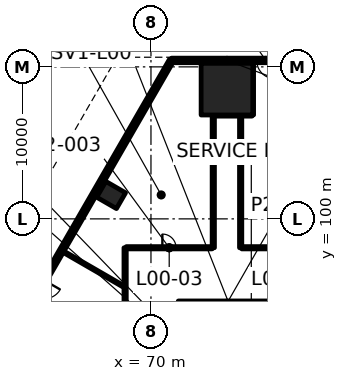
"""IFC4 building model, lengths in metres.
Left out: names, types, materials, properties, quantities, classifications, styles, units other than length and angle.
Written with IfcOpenShell. Run it as: python <this file> out.ifc"""

import sys

from ifc_helpers import new_model, si_unit, direction, frame, frame_2d, origin, origin_2d, place, context, subcontext, project, spatial, rectangle, extrude, element, fill, save


model = new_model("IFC4")
c1 = context("Model", 3, precision=1e-05, world=origin(), true_north=direction((0.0, 1.0)))
c2 = subcontext(c1, "Body", "Model", "MODEL_VIEW")
j1 = project(units=[si_unit("LENGTHUNIT", "METRE"), si_unit("PLANEANGLEUNIT", "RADIAN")], contexts=[c1])
p1 = place(None, origin())
s1 = spatial("IfcSite", under=j1, at=p1, CompositionType="ELEMENT")
p2 = place(p1, origin())
s2 = spatial("IfcBuilding", under=s1, at=p2, CompositionType="ELEMENT")
p3 = place(p2, origin())
s3 = spatial("IfcBuildingStorey", under=s2, at=p3, CompositionType="ELEMENT", Elevation=0.0)
p4 = place(p3, frame((75.0, 108.534, 0.0), z_axis=(0.0, 0.0, 1.0), x_axis=(-1.0, 0.0, 0.0)))
e1 = element("IfcColumn", 1, at=p4, inside=s3, PredefinedType="COLUMN", context=c2, shape_type="SweptSolid", body=[
    extrude(rectangle(XDim=3.4, YDim=3.4, at=origin_2d()), origin(), (0.0, 0.0, 1.0), 8.0),
])
p5 = place(p3, frame((67.379, 101.57, 0.0), z_axis=(0.0, 0.0, 1.0), x_axis=(-0.5, -0.866025403784, 0.0)))
e2 = element("IfcColumn", 2, at=p5, inside=s3, PredefinedType="COLUMN", context=c2, shape_type="SweptSolid", body=[
    extrude(rectangle(XDim=1.2, YDim=1.5, at=origin_2d()), origin(), (0.0, 0.0, 1.0), 8.0),
])
p6 = place(p3, frame((71.8, 94.45, 0.0), z_axis=(0.0, 0.0, 1.0), x_axis=(1.0, 0.0, 0.0)))
e3 = element("IfcWall", 3, at=p6, inside=s3, PredefinedType="SHEAR", context=c2, shape_type="SweptSolid", body=[
    extrude(rectangle(XDim=6.4, YDim=0.3, at=frame_2d((3.2, 0.0))), origin(), (0.0, 0.0, 1.0), 7.7),
])
p7 = place(p3, frame((68.375, 98.1, 0.0), z_axis=(0.0, 0.0, 1.0), x_axis=(1.0, 0.0, 0.0)))
e4 = element("IfcWall", 4, at=p7, inside=s3, PredefinedType="PARTITIONING", context=c2, shape_type="SweptSolid", body=[
    extrude(rectangle(XDim=5.649, YDim=0.15, at=frame_2d((2.825, 0.0))), origin(), (0.0, 0.0, 1.0), 7.1),
])
p8 = place(p7, frame((2.375, 0.0, 0.0)))
e5 = element("IfcOpeningElement", 5, at=p8, cuts=e4, PredefinedType="OPENING", context=c2, shape_type="SweptSolid", body=[
    extrude(rectangle(XDim=0.9, YDim=2.1, at=frame_2d((0.45, 1.05))), frame((0.0, 0.085, 0.0), z_axis=(0.0, -1.0, 0.0), x_axis=(1.0, 0.0, 0.0)), (0.0, 0.0, 1.0), 0.17),
])
p9 = place(p3, frame((75.975, 98.1, 0.0), z_axis=(0.0, 0.0, 1.0), x_axis=(1.0, 0.0, 0.0)))
e6 = element("IfcWall", 6, at=p9, inside=s3, PredefinedType="PARTITIONING", context=c2, shape_type="SweptSolid", body=[
    extrude(rectangle(XDim=5.649, YDim=0.15, at=frame_2d((2.825, 0.0))), origin(), (0.0, 0.0, 1.0), 7.1),
])
p10 = place(p9, frame((2.371, 0.0, 0.0)))
e7 = element("IfcOpeningElement", 7, at=p10, cuts=e6, PredefinedType="OPENING", context=c2, shape_type="SweptSolid", body=[
    extrude(rectangle(XDim=0.9, YDim=2.1, at=frame_2d((0.45, 1.05))), frame((0.0, 0.085, 0.0), z_axis=(0.0, -1.0, 0.0), x_axis=(1.0, 0.0, 0.0)), (0.0, 0.0, 1.0), 0.17),
])
p11 = place(p3, frame((74.176, 106.834, 0.0), z_axis=(0.0, 0.0, 1.0), x_axis=(1.0, 0.0, 0.0)))
e8 = element("IfcWall", 8, at=p11, inside=s3, PredefinedType="PARTITIONING", context=c2, shape_type="SweptSolid", body=[
    extrude(rectangle(XDim=1.649, YDim=0.15, at=frame_2d((0.825, 0.0))), origin(), (0.0, 0.0, 1.0), 7.097),
])
p12 = place(p3, frame((76.7, 106.834, 0.0), z_axis=(0.0, 0.0, 1.0), x_axis=(0.0, 1.0, 0.0)))
e9 = element("IfcWall", 9, at=p12, inside=s3, PredefinedType="PARTITIONING", context=c2, shape_type="SweptSolid", body=[
    extrude(rectangle(XDim=3.56, YDim=0.1, at=frame_2d((1.78, 0.0))), origin(), (0.0, 0.0, 1.0), 7.1),
])
p13 = place(p3, frame((75.9, 98.1, 0.0), z_axis=(0.0, 0.0, 1.0), x_axis=(0.0, 1.0, 0.0)))
e10 = element("IfcWall", 10, at=p13, inside=s3, PredefinedType="PARTITIONING", context=c2, shape_type="SweptSolid", body=[
    extrude(rectangle(XDim=8.734, YDim=0.15, at=frame_2d((4.367, 0.0))), origin(), (0.0, 0.0, 1.0), 7.1),
])
p14 = place(p3, frame((74.1, 98.1, 0.0), z_axis=(0.0, 0.0, 1.0), x_axis=(0.0, 1.0, 0.0)))
e11 = element("IfcWall", 11, at=p14, inside=s3, PredefinedType="PARTITIONING", context=c2, shape_type="SweptSolid", body=[
    extrude(rectangle(XDim=8.733, YDim=0.15, at=frame_2d((4.367, 0.0))), origin(), (0.0, 0.0, 1.0), 7.1),
])
p15 = place(p3, frame((68.3, 87.5, 0.0), z_axis=(0.0, 0.0, 1.0), x_axis=(0.0, 1.0, 0.0)))
e12 = element("IfcWall", 12, at=p15, inside=s3, PredefinedType="PARTITIONING", context=c2, shape_type="SweptSolid", body=[
    extrude(rectangle(XDim=10.6, YDim=0.15, at=frame_2d((5.3, 0.0))), origin(), (0.0, 0.0, 1.0), 7.1),
])
p16 = place(p3, frame((68.199, 95.554, 0.0), z_axis=(0.0, 0.0, 1.0), x_axis=(-0.866033412818, 0.49998612769, 0.0)))
e13 = element("IfcWall", 13, at=p16, inside=s3, PredefinedType="PARTITIONING", context=c2, shape_type="SweptSolid", body=[
    extrude(rectangle(XDim=4.676, YDim=0.1, at=frame_2d((2.338, 0.0))), origin(), (0.0, 0.0, 1.0), 6.865),
])
p17 = place(p3, frame((75.975, 106.834, 0.0), z_axis=(0.0, 0.0, 1.0), x_axis=(1.0, 0.0, 0.0)))
e14 = element("IfcWall", 14, at=p17, inside=s3, PredefinedType="PARTITIONING", context=c2, shape_type="SweptSolid", body=[
    extrude(rectangle(XDim=0.674, YDim=0.15, at=frame_2d((0.337, 0.0))), origin(), (0.0, 0.0, 1.0), 7.1),
])
p18 = place(p3, frame((78.652, 110.424, 0.0), z_axis=(0.0, 0.0, 1.0), x_axis=(-1.0, 0.0, 0.0)))
e15 = element("IfcWall", 15, at=p18, inside=s3, PredefinedType="SOLIDWALL", context=c2, shape_type="SweptSolid", body=[
    extrude(rectangle(XDim=7.304, YDim=0.3, at=frame_2d((3.652, 0.0))), origin(), (0.0, 0.0, 1.0), 7.7),
])
p19 = place(p18, frame((0.496, 0.0, 0.0)))
e16 = element("IfcOpeningElement", 16, at=p19, cuts=e15, PredefinedType="OPENING", context=c2, shape_type="SweptSolid", body=[
    extrude(rectangle(XDim=1.2, YDim=2.4, at=frame_2d((0.6, 1.2))), frame((0.0, 0.16, 0.0), z_axis=(0.0, -1.0, 0.0), x_axis=(1.0, 0.0, 0.0)), (0.0, 0.0, 1.0), 0.32),
])
p20 = place(p18, frame((3.852, 0.0, 0.15)))
e17 = element("IfcOpeningElement", 17, at=p20, cuts=e15, PredefinedType="OPENING", context=c2, shape_type="SweptSolid", body=[
    extrude(rectangle(XDim=2.1, YDim=5.4, at=frame_2d((1.05, 2.7))), frame((0.0, 0.16, 0.0), z_axis=(0.0, -1.0, 0.0), x_axis=(1.0, 0.0, 0.0)), (0.0, 0.0, 1.0), 0.32),
])
p21 = place(p3, frame((71.348, 110.424, 0.0), z_axis=(0.0, 0.0, 1.0), x_axis=(-0.500000550228, -0.86602508611, 0.0)))
e18 = element("IfcWall", 18, at=p21, inside=s3, PredefinedType="SOLIDWALL", context=c2, shape_type="SweptSolid", body=[
    extrude(rectangle(XDim=57.704, YDim=0.3, at=frame_2d((28.852, 0.0))), origin(), (0.0, 0.0, 1.0), 7.7),
])
p22 = place(p21, frame((16.711, 0.0, 0.0)))
e19 = element("IfcOpeningElement", 19, at=p22, cuts=e18, PredefinedType="OPENING", context=c2, shape_type="SweptSolid", body=[
    extrude(rectangle(XDim=1.2, YDim=2.4, at=frame_2d((0.6, 1.2))), frame((0.0, 0.16, 0.0), z_axis=(0.0, -1.0, 0.0), x_axis=(1.0, 0.0, 0.0)), (0.0, 0.0, 1.0), 0.32),
])
p23 = place(p21, frame((1.552, 0.0, 0.15)))
e20 = element("IfcOpeningElement", 20, at=p23, cuts=e18, PredefinedType="OPENING", context=c2, shape_type="SweptSolid", body=[
    extrude(rectangle(XDim=2.1, YDim=5.4, at=frame_2d((1.05, 2.7))), frame((0.0, 0.16, 0.0), z_axis=(0.0, -1.0, 0.0), x_axis=(1.0, 0.0, 0.0)), (0.0, 0.0, 1.0), 0.32),
])
p24 = place(p21, frame((4.052, 0.0, 0.15)))
e21 = element("IfcOpeningElement", 21, at=p24, cuts=e18, PredefinedType="OPENING", context=c2, shape_type="SweptSolid", body=[
    extrude(rectangle(XDim=2.1, YDim=5.4, at=frame_2d((1.05, 2.7))), frame((0.0, 0.16, 0.0), z_axis=(0.0, -1.0, 0.0), x_axis=(1.0, 0.0, 0.0)), (0.0, 0.0, 1.0), 0.32),
])
p25 = place(p21, frame((6.552, 0.0, 0.15)))
e22 = element("IfcOpeningElement", 22, at=p25, cuts=e18, PredefinedType="OPENING", context=c2, shape_type="SweptSolid", body=[
    extrude(rectangle(XDim=2.1, YDim=5.4, at=frame_2d((1.05, 2.7))), frame((0.0, 0.16, 0.0), z_axis=(0.0, -1.0, 0.0), x_axis=(1.0, 0.0, 0.0)), (0.0, 0.0, 1.0), 0.32),
])
p26 = place(p21, frame((9.052, 0.0, 0.15)))
e23 = element("IfcOpeningElement", 23, at=p26, cuts=e18, PredefinedType="OPENING", context=c2, shape_type="SweptSolid", body=[
    extrude(rectangle(XDim=2.1, YDim=5.4, at=frame_2d((1.05, 2.7))), frame((0.0, 0.16, 0.0), z_axis=(0.0, -1.0, 0.0), x_axis=(1.0, 0.0, 0.0)), (0.0, 0.0, 1.0), 0.32),
])
p27 = place(p21, frame((11.552, 0.0, 0.15)))
e24 = element("IfcOpeningElement", 24, at=p27, cuts=e18, PredefinedType="OPENING", context=c2, shape_type="SweptSolid", body=[
    extrude(rectangle(XDim=2.1, YDim=5.4, at=frame_2d((1.05, 2.7))), frame((0.0, 0.16, 0.0), z_axis=(0.0, -1.0, 0.0), x_axis=(1.0, 0.0, 0.0)), (0.0, 0.0, 1.0), 0.32),
])
p28 = place(p21, frame((14.052, 0.0, 0.15)))
e25 = element("IfcOpeningElement", 25, at=p28, cuts=e18, PredefinedType="OPENING", context=c2, shape_type="SweptSolid", body=[
    extrude(rectangle(XDim=2.1, YDim=5.4, at=frame_2d((1.05, 2.7))), frame((0.0, 0.16, 0.0), z_axis=(0.0, -1.0, 0.0), x_axis=(1.0, 0.0, 0.0)), (0.0, 0.0, 1.0), 0.32),
])
p29 = place(p21, frame((19.052, 0.0, 0.15)))
e26 = element("IfcOpeningElement", 26, at=p29, cuts=e18, PredefinedType="OPENING", context=c2, shape_type="SweptSolid", body=[
    extrude(rectangle(XDim=2.1, YDim=5.4, at=frame_2d((1.05, 2.7))), frame((0.0, 0.16, 0.0), z_axis=(0.0, -1.0, 0.0), x_axis=(1.0, 0.0, 0.0)), (0.0, 0.0, 1.0), 0.32),
])
p30 = place(p21, frame((21.552, 0.0, 0.15)))
e27 = element("IfcOpeningElement", 27, at=p30, cuts=e18, PredefinedType="OPENING", context=c2, shape_type="SweptSolid", body=[
    extrude(rectangle(XDim=2.1, YDim=5.4, at=frame_2d((1.05, 2.7))), frame((0.0, 0.16, 0.0), z_axis=(0.0, -1.0, 0.0), x_axis=(1.0, 0.0, 0.0)), (0.0, 0.0, 1.0), 0.32),
])
p31 = place(p21, frame((24.052, 0.0, 0.15)))
e28 = element("IfcOpeningElement", 28, at=p31, cuts=e18, PredefinedType="OPENING", context=c2, shape_type="SweptSolid", body=[
    extrude(rectangle(XDim=2.1, YDim=5.4, at=frame_2d((1.05, 2.7))), frame((0.0, 0.16, 0.0), z_axis=(0.0, -1.0, 0.0), x_axis=(1.0, 0.0, 0.0)), (0.0, 0.0, 1.0), 0.32),
])
p32 = place(p21, frame((26.552, 0.0, 0.15)))
e29 = element("IfcOpeningElement", 29, at=p32, cuts=e18, PredefinedType="OPENING", context=c2, shape_type="SweptSolid", body=[
    extrude(rectangle(XDim=2.1, YDim=5.4, at=frame_2d((1.05, 2.7))), frame((0.0, 0.16, 0.0), z_axis=(0.0, -1.0, 0.0), x_axis=(1.0, 0.0, 0.0)), (0.0, 0.0, 1.0), 0.32),
])
p33 = place(p21, frame((29.052, 0.0, 0.15)))
e30 = element("IfcOpeningElement", 30, at=p33, cuts=e18, PredefinedType="OPENING", context=c2, shape_type="SweptSolid", body=[
    extrude(rectangle(XDim=2.1, YDim=5.4, at=frame_2d((1.05, 2.7))), frame((0.0, 0.16, 0.0), z_axis=(0.0, -1.0, 0.0), x_axis=(1.0, 0.0, 0.0)), (0.0, 0.0, 1.0), 0.32),
])
p34 = place(p21, frame((31.552, 0.0, 0.15)))
e31 = element("IfcOpeningElement", 31, at=p34, cuts=e18, PredefinedType="OPENING", context=c2, shape_type="SweptSolid", body=[
    extrude(rectangle(XDim=2.1, YDim=5.4, at=frame_2d((1.05, 2.7))), frame((0.0, 0.16, 0.0), z_axis=(0.0, -1.0, 0.0), x_axis=(1.0, 0.0, 0.0)), (0.0, 0.0, 1.0), 0.32),
])
p35 = place(p21, frame((34.052, 0.0, 0.15)))
e32 = element("IfcOpeningElement", 32, at=p35, cuts=e18, PredefinedType="OPENING", context=c2, shape_type="SweptSolid", body=[
    extrude(rectangle(XDim=2.1, YDim=5.4, at=frame_2d((1.05, 2.7))), frame((0.0, 0.16, 0.0), z_axis=(0.0, -1.0, 0.0), x_axis=(1.0, 0.0, 0.0)), (0.0, 0.0, 1.0), 0.32),
])
p36 = place(p21, frame((36.552, 0.0, 0.15)))
e33 = element("IfcOpeningElement", 33, at=p36, cuts=e18, PredefinedType="OPENING", context=c2, shape_type="SweptSolid", body=[
    extrude(rectangle(XDim=2.1, YDim=5.4, at=frame_2d((1.05, 2.7))), frame((0.0, 0.16, 0.0), z_axis=(0.0, -1.0, 0.0), x_axis=(1.0, 0.0, 0.0)), (0.0, 0.0, 1.0), 0.32),
])
p37 = place(p21, frame((39.052, 0.0, 0.15)))
e34 = element("IfcOpeningElement", 34, at=p37, cuts=e18, PredefinedType="OPENING", context=c2, shape_type="SweptSolid", body=[
    extrude(rectangle(XDim=2.1, YDim=5.4, at=frame_2d((1.05, 2.7))), frame((0.0, 0.16, 0.0), z_axis=(0.0, -1.0, 0.0), x_axis=(1.0, 0.0, 0.0)), (0.0, 0.0, 1.0), 0.32),
])
p38 = place(p21, frame((41.552, 0.0, 0.15)))
e35 = element("IfcOpeningElement", 35, at=p38, cuts=e18, PredefinedType="OPENING", context=c2, shape_type="SweptSolid", body=[
    extrude(rectangle(XDim=2.1, YDim=5.4, at=frame_2d((1.05, 2.7))), frame((0.0, 0.16, 0.0), z_axis=(0.0, -1.0, 0.0), x_axis=(1.0, 0.0, 0.0)), (0.0, 0.0, 1.0), 0.32),
])
p39 = place(p21, frame((44.052, 0.0, 0.15)))
e36 = element("IfcOpeningElement", 36, at=p39, cuts=e18, PredefinedType="OPENING", context=c2, shape_type="SweptSolid", body=[
    extrude(rectangle(XDim=2.1, YDim=5.4, at=frame_2d((1.05, 2.7))), frame((0.0, 0.16, 0.0), z_axis=(0.0, -1.0, 0.0), x_axis=(1.0, 0.0, 0.0)), (0.0, 0.0, 1.0), 0.32),
])
p40 = place(p21, frame((46.552, 0.0, 0.15)))
e37 = element("IfcOpeningElement", 37, at=p40, cuts=e18, PredefinedType="OPENING", context=c2, shape_type="SweptSolid", body=[
    extrude(rectangle(XDim=2.1, YDim=5.4, at=frame_2d((1.05, 2.7))), frame((0.0, 0.16, 0.0), z_axis=(0.0, -1.0, 0.0), x_axis=(1.0, 0.0, 0.0)), (0.0, 0.0, 1.0), 0.32),
])
p41 = place(p21, frame((49.052, 0.0, 0.15)))
e38 = element("IfcOpeningElement", 38, at=p41, cuts=e18, PredefinedType="OPENING", context=c2, shape_type="SweptSolid", body=[
    extrude(rectangle(XDim=2.1, YDim=5.4, at=frame_2d((1.05, 2.7))), frame((0.0, 0.16, 0.0), z_axis=(0.0, -1.0, 0.0), x_axis=(1.0, 0.0, 0.0)), (0.0, 0.0, 1.0), 0.32),
])
p42 = place(p21, frame((51.552, 0.0, 0.15)))
e39 = element("IfcOpeningElement", 39, at=p42, cuts=e18, PredefinedType="OPENING", context=c2, shape_type="SweptSolid", body=[
    extrude(rectangle(XDim=2.1, YDim=5.4, at=frame_2d((1.05, 2.7))), frame((0.0, 0.16, 0.0), z_axis=(0.0, -1.0, 0.0), x_axis=(1.0, 0.0, 0.0)), (0.0, 0.0, 1.0), 0.32),
])
p43 = place(p21, frame((54.052, 0.0, 0.15)))
e40 = element("IfcOpeningElement", 40, at=p43, cuts=e18, PredefinedType="OPENING", context=c2, shape_type="SweptSolid", body=[
    extrude(rectangle(XDim=2.1, YDim=5.4, at=frame_2d((1.05, 2.7))), frame((0.0, 0.16, 0.0), z_axis=(0.0, -1.0, 0.0), x_axis=(1.0, 0.0, 0.0)), (0.0, 0.0, 1.0), 0.32),
])
p44 = place(p8, origin())
e41 = element("IfcDoor", 41, at=p44, inside=s3, OperationType="SINGLE_SWING_RIGHT", PredefinedType="DOOR", context=c2, shape_type="SweptSolid", body=[
    extrude(rectangle(XDim=0.9, YDim=2.1, at=frame_2d((0.45, 1.05))), frame((0.0, 0.025, 0.0), z_axis=(0.0, -1.0, 0.0), x_axis=(1.0, 0.0, 0.0)), (0.0, 0.0, 1.0), 0.05),
])
fill(e5, e41)
p45 = place(p19, origin())
e42 = element("IfcDoor", 42, at=p45, inside=s3, OperationType="SINGLE_SWING_LEFT", PredefinedType="DOOR", context=c2, shape_type="SweptSolid", body=[
    extrude(rectangle(XDim=1.2, YDim=2.4, at=frame_2d((0.6, 1.2))), frame((0.0, 0.025, 0.0), z_axis=(0.0, -1.0, 0.0), x_axis=(1.0, 0.0, 0.0)), (0.0, 0.0, 1.0), 0.05),
])
fill(e16, e42)
p46 = place(p20, origin())
e43 = element("IfcWindow", 43, at=p46, inside=s3, PartitioningType="SINGLE_PANEL", PredefinedType="WINDOW", context=c2, shape_type="SweptSolid", body=[
    extrude(rectangle(XDim=2.1, YDim=5.4, at=frame_2d((1.05, 2.7))), frame((0.0, 0.03, 0.0), z_axis=(0.0, -1.0, 0.0), x_axis=(1.0, 0.0, 0.0)), (0.0, 0.0, 1.0), 0.06),
])
fill(e17, e43)
p47 = place(p23, origin())
e44 = element("IfcWindow", 44, at=p47, inside=s3, PartitioningType="SINGLE_PANEL", PredefinedType="WINDOW", context=c2, shape_type="SweptSolid", body=[
    extrude(rectangle(XDim=2.1, YDim=5.4, at=frame_2d((1.05, 2.7))), frame((0.0, 0.03, 0.0), z_axis=(0.0, -1.0, 0.0), x_axis=(1.0, 0.0, 0.0)), (0.0, 0.0, 1.0), 0.06),
])
fill(e20, e44)
p48 = place(p24, origin())
e45 = element("IfcWindow", 45, at=p48, inside=s3, PartitioningType="SINGLE_PANEL", PredefinedType="WINDOW", context=c2, shape_type="SweptSolid", body=[
    extrude(rectangle(XDim=2.1, YDim=5.4, at=frame_2d((1.05, 2.7))), frame((0.0, 0.03, 0.0), z_axis=(0.0, -1.0, 0.0), x_axis=(1.0, 0.0, 0.0)), (0.0, 0.0, 1.0), 0.06),
])
fill(e21, e45)
p49 = place(p25, origin())
e46 = element("IfcWindow", 46, at=p49, inside=s3, PartitioningType="SINGLE_PANEL", PredefinedType="WINDOW", context=c2, shape_type="SweptSolid", body=[
    extrude(rectangle(XDim=2.1, YDim=5.4, at=frame_2d((1.05, 2.7))), frame((0.0, 0.03, 0.0), z_axis=(0.0, -1.0, 0.0), x_axis=(1.0, 0.0, 0.0)), (0.0, 0.0, 1.0), 0.06),
])
fill(e22, e46)
p50 = place(p26, origin())
e47 = element("IfcWindow", 47, at=p50, inside=s3, PartitioningType="SINGLE_PANEL", PredefinedType="WINDOW", context=c2, shape_type="SweptSolid", body=[
    extrude(rectangle(XDim=2.1, YDim=5.4, at=frame_2d((1.05, 2.7))), frame((0.0, 0.03, 0.0), z_axis=(0.0, -1.0, 0.0), x_axis=(1.0, 0.0, 0.0)), (0.0, 0.0, 1.0), 0.06),
])
fill(e23, e47)
p51 = place(p27, origin())
e48 = element("IfcWindow", 48, at=p51, inside=s3, PartitioningType="SINGLE_PANEL", PredefinedType="WINDOW", context=c2, shape_type="SweptSolid", body=[
    extrude(rectangle(XDim=2.1, YDim=5.4, at=frame_2d((1.05, 2.7))), frame((0.0, 0.03, 0.0), z_axis=(0.0, -1.0, 0.0), x_axis=(1.0, 0.0, 0.0)), (0.0, 0.0, 1.0), 0.06),
])
fill(e24, e48)
p52 = place(p28, origin())
e49 = element("IfcWindow", 49, at=p52, inside=s3, PartitioningType="SINGLE_PANEL", PredefinedType="WINDOW", context=c2, shape_type="SweptSolid", body=[
    extrude(rectangle(XDim=2.1, YDim=5.4, at=frame_2d((1.05, 2.7))), frame((0.0, 0.03, 0.0), z_axis=(0.0, -1.0, 0.0), x_axis=(1.0, 0.0, 0.0)), (0.0, 0.0, 1.0), 0.06),
])
fill(e25, e49)
save(model, sys.argv[1])
